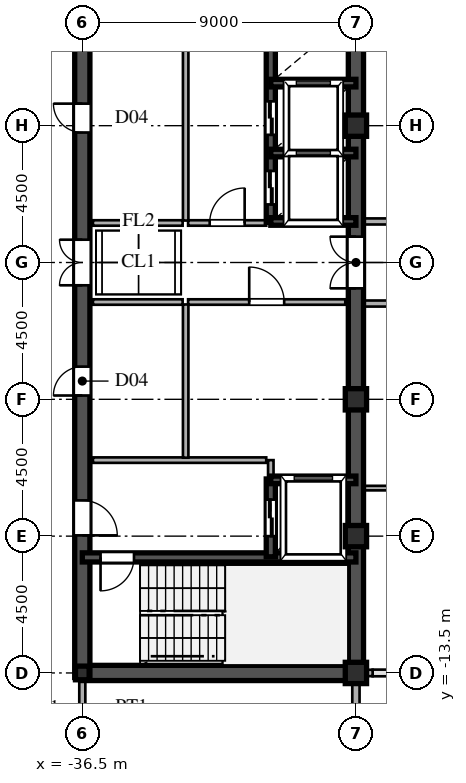
"""IFC4 building model, lengths in metres.
Left out: names, types, materials, properties, quantities, classifications, styles, units other than length and angle.
Written with IfcOpenShell. Run it as: python <this file> out.ifc"""

import sys

from ifc_helpers import new_model, si_unit, direction, frame, frame_2d, origin, origin_2d, place, context, subcontext, project, spatial, rectangle, hollow_rectangle, i_section, extrude, source, transform, mapped, element, fill, save


model = new_model("IFC4")
c1 = context("Model", 3, precision=1e-05, world=origin(), true_north=direction((0.0, 1.0)))
c2 = subcontext(c1, "Body", "Model", "MODEL_VIEW")
j1 = project(units=[si_unit("LENGTHUNIT", "METRE"), si_unit("PLANEANGLEUNIT", "RADIAN")], contexts=[c1])
p1 = place(None, origin())
s1 = spatial("IfcSite", under=j1, at=p1, CompositionType="ELEMENT")
p2 = place(p1, origin())
s2 = spatial("IfcBuilding", under=s1, at=p2, CompositionType="ELEMENT")
p3 = place(p2, frame((0.0, 0.0, 261.9)))
s3 = spatial("IfcBuildingStorey", under=s2, at=p3, CompositionType="ELEMENT", Elevation=261.9)
m1 = source(origin(), c2, "Body", "SweptSolid", [
    extrude(hollow_rectangle(XDim=0.7, YDim=0.7, WallThickness=0.03, at=origin_2d()), origin(), (0.0, 0.0, 1.0), 3.75),
])
for number, where, z_axis, x_axis in (
    (1, (-27.5, -13.5, 0.0), (0.0, 0.0, 1.0), (1.0, 0.0, 0.0)),
    (2, (-27.5, -9.0, 0.0), (0.0, 0.0, 1.0), (1.0, 0.0, 0.0)),
    (3, (-27.5, -4.5, 0.0), (0.0, 0.0, 1.0), (1.0, 0.0, 0.0)),
    (4, (-27.5, 4.5, 0.0), (0.0, 0.0, 1.0), (1.0, 0.0, 0.0)),
):
    element("IfcColumn", number, at=place(p3, frame(where, z_axis=z_axis, x_axis=x_axis)), inside=s3, PredefinedType="COLUMN", context=c2, shape_type="MappedRepresentation", body=[
        mapped(m1, transform((0.0, 0.0, 0.0), scale=1.0)),
    ])
m2 = source(origin(), c2, "Body", "SweptSolid", [
    extrude(i_section(OverallWidth=0.45, OverallDepth=0.45, WebThickness=0.016, FlangeThickness=0.025, at=origin_2d()), origin(), (0.0, 0.0, 1.0), 3.75),
])
p4 = place(p3, frame((-36.5, -13.5, 0.0), z_axis=(0.0, 0.0, 1.0), x_axis=(1.0, 0.0, 0.0)))
e5 = element("IfcColumn", 5, at=p4, inside=s3, PredefinedType="COLUMN", context=c2, shape_type="MappedRepresentation", body=[
    mapped(m2, transform((0.0, 0.0, 0.0), scale=1.0)),
])
p5 = place(p3, frame((-27.5, -15.98, 0.0), z_axis=(0.0, 0.0, 1.0), x_axis=(0.0, 1.0, 0.0)))
e6 = element("IfcWall", 6, at=p5, inside=s3, PredefinedType="SOLIDWALL", context=c2, shape_type="SweptSolid", body=[
    extrude(rectangle(XDim=1.605, YDim=0.24, at=frame_2d((0.803, 0.0))), origin(), (0.0, 0.0, 1.0), 3.53),
])
p6 = place(p3, frame((-27.5, -14.375, 0.0), z_axis=(0.0, 0.0, 1.0), x_axis=(0.0, 1.0, 0.0)))
e7 = element("IfcWall", 7, at=p6, inside=s3, PredefinedType="SOLIDWALL", context=c2, shape_type="SweptSolid", body=[
    extrude(rectangle(XDim=0.62, YDim=0.24, at=frame_2d((0.31, 0.0))), origin(), (0.0, 0.0, 1.0), 3.03),
])
p7 = place(p3, frame((-27.49, -13.5, 0.0), z_axis=(0.0, 0.0, 1.0), x_axis=(1.0, 0.0, 0.0)))
e8 = element("IfcWall", 8, at=p7, inside=s3, PredefinedType="SOLIDWALL", context=c2, shape_type="SweptSolid", body=[
    extrude(rectangle(XDim=0.54, YDim=0.21, at=frame_2d((0.27, 0.0))), origin(), (0.0, 0.0, 1.0), 3.03),
])
for number, where, z_axis, x_axis in (
    (9, (-27.5, -13.5, 0.0), (0.0, 0.0, 1.0), (0.0, 1.0, 0.0)),
    (10, (-27.5, 1.3, 0.0), (0.0, 0.0, 1.0), (0.0, 1.0, 0.0)),
):
    element("IfcWall", number, at=place(p3, frame(where, z_axis=z_axis, x_axis=x_axis)), inside=s3, PredefinedType="SHEAR", context=c2, shape_type="SweptSolid", body=[
        extrude(rectangle(XDim=12.2, YDim=0.5, at=frame_2d((6.1, 0.0))), origin(), (0.0, 0.0, 1.0), 3.53),
    ])
p8 = place(p3, frame((-27.5, -1.3, 0.0), z_axis=(0.0, 0.0, 1.0), x_axis=(0.0, 1.0, 0.0)))
e11 = element("IfcWall", 11, at=p8, inside=s3, PredefinedType="SHEAR", context=c2, shape_type="SweptSolid", body=[
    extrude(rectangle(XDim=2.6, YDim=0.5, at=frame_2d((1.3, 0.0))), origin(), (0.0, 0.0, 1.0), 3.53),
])
p9 = place(p8, frame((0.45, 0.0, 0.0)))
e12 = element("IfcOpeningElement", 12, at=p9, cuts=e11, PredefinedType="OPENING", context=c2, shape_type="SweptSolid", body=[
    extrude(rectangle(XDim=1.7, YDim=2.35, at=frame_2d((0.85, 1.175))), frame((0.0, 0.26, 0.0), z_axis=(0.0, -1.0, 0.0), x_axis=(1.0, 0.0, 0.0)), (0.0, 0.0, 1.0), 0.52),
])
p10 = place(p3, frame((-36.5, -13.5, 0.0), z_axis=(0.0, 0.0, 1.0), x_axis=(1.0, 0.0, 0.0)))
e13 = element("IfcWall", 13, at=p10, inside=s3, PredefinedType="SHEAR", context=c2, shape_type="SweptSolid", body=[
    extrude(rectangle(XDim=9.0, YDim=0.5, at=frame_2d((4.5, 0.0))), origin(), (0.0, 0.0, 1.0), 3.53),
])
p11 = place(p3, frame((-36.5, -13.65, 0.0), z_axis=(0.0, 0.0, 1.0), x_axis=(0.0, 1.0, 0.0)))
e14 = element("IfcWall", 14, at=p11, inside=s3, PredefinedType="SHEAR", context=c2, shape_type="SweptSolid", body=[
    extrude(rectangle(XDim=7.15, YDim=0.5, at=frame_2d((3.575, 0.0))), origin(), (0.0, 0.0, 1.0), 3.53),
])
p12 = place(p11, frame((4.675, 0.0, 0.0)))
e15 = element("IfcOpeningElement", 15, at=p12, cuts=e14, PredefinedType="OPENING", context=c2, shape_type="SweptSolid", body=[
    extrude(rectangle(XDim=1.15, YDim=2.2, at=frame_2d((0.575, 1.1))), frame((0.0, 0.26, 0.0), z_axis=(0.0, -1.0, 0.0), x_axis=(1.0, 0.0, 0.0)), (0.0, 0.0, 1.0), 0.52),
])
p13 = place(p3, frame((-36.5, -1.3, 0.0), z_axis=(0.0, 0.0, 1.0), x_axis=(0.0, 1.0, 0.0)))
e16 = element("IfcWall", 16, at=p13, inside=s3, PredefinedType="SHEAR", context=c2, shape_type="SweptSolid", body=[
    extrude(rectangle(XDim=2.6, YDim=0.5, at=frame_2d((1.3, 0.0))), origin(), (0.0, 0.0, 1.0), 3.53),
])
p14 = place(p13, frame((0.55, 0.0, 0.0)))
e17 = element("IfcOpeningElement", 17, at=p14, cuts=e16, PredefinedType="OPENING", context=c2, shape_type="SweptSolid", body=[
    extrude(rectangle(XDim=1.5, YDim=2.3, at=frame_2d((0.75, 1.15))), frame((0.0, 0.26, 0.0), z_axis=(0.0, -1.0, 0.0), x_axis=(1.0, 0.0, 0.0)), (0.0, 0.0, 1.0), 0.52),
])
p15 = place(p3, frame((-36.5, -6.5, 0.0), z_axis=(0.0, 0.0, 1.0), x_axis=(0.0, 1.0, 0.0)))
e18 = element("IfcWall", 18, at=p15, inside=s3, PredefinedType="SHEAR", context=c2, shape_type="SweptSolid", body=[
    extrude(rectangle(XDim=5.2, YDim=0.5, at=frame_2d((2.6, 0.0))), origin(), (0.0, 0.0, 1.0), 3.53),
])
p16 = place(p15, frame((2.125, 0.0, 0.0)))
e19 = element("IfcOpeningElement", 19, at=p16, cuts=e18, PredefinedType="OPENING", context=c2, shape_type="SweptSolid", body=[
    extrude(rectangle(XDim=0.95, YDim=2.15, at=frame_2d((0.475, 1.075))), frame((0.0, 0.26, 0.0), z_axis=(0.0, -1.0, 0.0), x_axis=(1.0, 0.0, 0.0)), (0.0, 0.0, 1.0), 0.52),
])
p17 = place(p3, frame((-36.5, 1.3, 0.0), z_axis=(0.0, 0.0, 1.0), x_axis=(0.0, 1.0, 0.0)))
e20 = element("IfcWall", 20, at=p17, inside=s3, PredefinedType="SHEAR", context=c2, shape_type="SweptSolid", body=[
    extrude(rectangle(XDim=6.9, YDim=0.5, at=frame_2d((3.45, 0.0))), origin(), (0.0, 0.0, 1.0), 3.53),
])
p18 = place(p17, frame((2.975, 0.0, 0.0)))
e21 = element("IfcOpeningElement", 21, at=p18, cuts=e20, PredefinedType="OPENING", context=c2, shape_type="SweptSolid", body=[
    extrude(rectangle(XDim=0.95, YDim=2.15, at=frame_2d((0.475, 1.075))), frame((0.0, 0.26, 0.0), z_axis=(0.0, -1.0, 0.0), x_axis=(1.0, 0.0, 0.0)), (0.0, 0.0, 1.0), 0.52),
])
p19 = place(p3, frame((-36.5, -9.7, 0.0), z_axis=(0.0, 0.0, 1.0), x_axis=(1.0, 0.0, 0.0)))
e22 = element("IfcWall", 22, at=p19, inside=s3, PredefinedType="SHEAR", context=c2, shape_type="SweptSolid", body=[
    extrude(rectangle(XDim=9.0, YDim=0.3, at=frame_2d((4.5, 0.0))), origin(), (0.0, 0.0, 1.0), 3.53),
])
p20 = place(p19, frame((0.6, 0.0, 0.0)))
e23 = element("IfcOpeningElement", 23, at=p20, cuts=e22, PredefinedType="OPENING", context=c2, shape_type="SweptSolid", body=[
    extrude(rectangle(XDim=1.1, YDim=2.2, at=frame_2d((0.55, 1.1))), frame((0.0, 0.16, 0.0), z_axis=(0.0, -1.0, 0.0), x_axis=(1.0, 0.0, 0.0)), (0.0, 0.0, 1.0), 0.32),
])
for number, where, z_axis, x_axis in (
    (24, (-30.3, -7.15, 0.0), (0.0, 0.0, 1.0), (1.0, 0.0, 0.0)),
    (25, (-30.3, 1.35, 0.0), (0.0, 0.0, 1.0), (1.0, 0.0, 0.0)),
    (26, (-30.3, 3.6, 0.0), (0.0, 0.0, 1.0), (1.0, 0.0, 0.0)),
    (27, (-30.3, 5.9, 0.0), (0.0, 0.0, 1.0), (1.0, 0.0, 0.0)),
):
    element("IfcWall", number, at=place(p3, frame(where, z_axis=z_axis, x_axis=x_axis)), inside=s3, PredefinedType="SHEAR", context=c2, shape_type="SweptSolid", body=[
        extrude(rectangle(XDim=2.8, YDim=0.25, at=frame_2d((1.4, 0.0))), origin(), (0.0, 0.0, 1.0), 3.53),
    ])
p21 = place(p3, frame((-30.3, -9.68, 0.0), z_axis=(0.0, 0.0, 1.0), x_axis=(0.0, 1.0, 0.0)))
e28 = element("IfcWall", 28, at=p21, inside=s3, PredefinedType="SHEAR", context=c2, shape_type="SweptSolid", body=[
    extrude(rectangle(XDim=2.56, YDim=0.3, at=frame_2d((1.28, 0.0))), origin(), (0.0, 0.0, 1.0), 3.53),
])
p22 = place(p21, frame((0.68, 0.0, 0.0)))
e29 = element("IfcOpeningElement", 29, at=p22, cuts=e28, PredefinedType="OPENING", context=c2, shape_type="SweptSolid", body=[
    extrude(rectangle(XDim=1.2, YDim=2.25, at=frame_2d((0.6, 1.125))), frame((0.0, 0.16, 0.0), z_axis=(0.0, -1.0, 0.0), x_axis=(1.0, 0.0, 0.0)), (0.0, 0.0, 1.0), 0.32),
])
p23 = place(p3, frame((-30.3, 1.32, 0.0), z_axis=(0.0, 0.0, 1.0), x_axis=(0.0, 1.0, 0.0)))
e30 = element("IfcWall", 30, at=p23, inside=s3, PredefinedType="SHEAR", context=c2, shape_type="SweptSolid", body=[
    extrude(rectangle(XDim=2.28, YDim=0.3, at=frame_2d((1.14, 0.0))), origin(), (0.0, 0.0, 1.0), 3.53),
])
p24 = place(p23, frame((0.59, 0.0, 0.0)))
e31 = element("IfcOpeningElement", 31, at=p24, cuts=e30, PredefinedType="OPENING", context=c2, shape_type="SweptSolid", body=[
    extrude(rectangle(XDim=1.1, YDim=2.2, at=frame_2d((0.55, 1.1))), frame((0.0, 0.16, 0.0), z_axis=(0.0, -1.0, 0.0), x_axis=(1.0, 0.0, 0.0)), (0.0, 0.0, 1.0), 0.32),
])
p25 = place(p3, frame((-30.3, 3.6, 0.0), z_axis=(0.0, 0.0, 1.0), x_axis=(0.0, 1.0, 0.0)))
e32 = element("IfcWall", 32, at=p25, inside=s3, PredefinedType="SHEAR", context=c2, shape_type="SweptSolid", body=[
    extrude(rectangle(XDim=2.3, YDim=0.3, at=frame_2d((1.15, 0.0))), origin(), (0.0, 0.0, 1.0), 3.53),
])
p26 = place(p25, frame((0.6, 0.0, 0.0)))
e33 = element("IfcOpeningElement", 33, at=p26, cuts=e32, PredefinedType="OPENING", context=c2, shape_type="SweptSolid", body=[
    extrude(rectangle(XDim=1.1, YDim=2.2, at=frame_2d((0.55, 1.1))), frame((0.0, 0.16, 0.0), z_axis=(0.0, -1.0, 0.0), x_axis=(1.0, 0.0, 0.0)), (0.0, 0.0, 1.0), 0.32),
])
p27 = place(p3, frame((-30.3, 5.9, 0.0), z_axis=(0.0, 0.0, 1.0), x_axis=(0.0, 1.0, 0.0)))
e34 = element("IfcWall", 34, at=p27, inside=s3, PredefinedType="SHEAR", context=c2, shape_type="SweptSolid", body=[
    extrude(rectangle(XDim=2.25, YDim=0.3, at=frame_2d((1.125, 0.0))), origin(), (0.0, 0.0, 1.0), 3.53),
])
p28 = place(p3, frame((-36.15, -6.5, 0.0), z_axis=(0.0, 0.0, 1.0), x_axis=(1.0, 0.0, 0.0)))
e35 = element("IfcWall", 35, at=p28, inside=s3, PredefinedType="PARTITIONING", context=c2, shape_type="SweptSolid", body=[
    extrude(rectangle(XDim=5.7, YDim=0.18, at=frame_2d((2.85, 0.0))), origin(), (0.0, 0.0, 1.0), 3.53),
])
p29 = place(p3, frame((-30.3, -7.12, 0.0), z_axis=(0.0, 0.0, 1.0), x_axis=(0.0, 1.0, 0.0)))
e36 = element("IfcWall", 36, at=p29, inside=s3, PredefinedType="PARTITIONING", context=c2, shape_type="SweptSolid", body=[
    extrude(rectangle(XDim=0.62, YDim=0.18, at=frame_2d((0.31, 0.0))), origin(), (0.0, 0.0, 1.0), 3.53),
])
p30 = place(p3, frame((-33.1, -6.42, 0.0), z_axis=(0.0, 0.0, 1.0), x_axis=(0.0, 1.0, 0.0)))
e37 = element("IfcWall", 37, at=p30, inside=s3, PredefinedType="PARTITIONING", context=c2, shape_type="SweptSolid", body=[
    extrude(rectangle(XDim=5.04, YDim=0.18, at=frame_2d((2.52, 0.0))), origin(), (0.0, 0.0, 1.0), 3.53),
])
p31 = place(p3, frame((-33.1, 1.38, 0.0), z_axis=(0.0, 0.0, 1.0), x_axis=(0.0, 1.0, 0.0)))
e38 = element("IfcWall", 38, at=p31, inside=s3, PredefinedType="PARTITIONING", context=c2, shape_type="SweptSolid", body=[
    extrude(rectangle(XDim=6.74, YDim=0.18, at=frame_2d((3.37, 0.0))), origin(), (0.0, 0.0, 1.0), 3.53),
])
p32 = place(p3, frame((-33.02, -1.3, 0.0), z_axis=(0.0, 0.0, 1.0), x_axis=(1.0, 0.0, 0.0)))
e39 = element("IfcWall", 39, at=p32, inside=s3, PredefinedType="PARTITIONING", context=c2, shape_type="SweptSolid", body=[
    extrude(rectangle(XDim=5.17, YDim=0.18, at=frame_2d((2.585, 0.0))), origin(), (0.0, 0.0, 1.0), 3.53),
])
p33 = place(p32, frame((2.01, 0.0, 0.0)))
e40 = element("IfcOpeningElement", 40, at=p33, cuts=e39, PredefinedType="OPENING", context=c2, shape_type="SweptSolid", body=[
    extrude(rectangle(XDim=1.15, YDim=2.2, at=frame_2d((0.575, 1.1))), frame((0.0, 0.1, 0.0), z_axis=(0.0, -1.0, 0.0), x_axis=(1.0, 0.0, 0.0)), (0.0, 0.0, 1.0), 0.2),
])
p34 = place(p3, frame((-33.02, 1.3, 0.0), z_axis=(0.0, 0.0, 1.0), x_axis=(1.0, 0.0, 0.0)))
e41 = element("IfcWall", 41, at=p34, inside=s3, PredefinedType="PARTITIONING", context=c2, shape_type="SweptSolid", body=[
    extrude(rectangle(XDim=2.57, YDim=0.18, at=frame_2d((1.285, 0.0))), origin(), (0.0, 0.0, 1.0), 3.53),
])
p35 = place(p34, frame((0.71, 0.0, 0.0)))
e42 = element("IfcOpeningElement", 42, at=p35, cuts=e41, PredefinedType="OPENING", context=c2, shape_type="SweptSolid", body=[
    extrude(rectangle(XDim=1.15, YDim=2.2, at=frame_2d((0.575, 1.1))), frame((0.0, 0.1, 0.0), z_axis=(0.0, -1.0, 0.0), x_axis=(1.0, 0.0, 0.0)), (0.0, 0.0, 1.0), 0.2),
])
for number, where, z_axis, x_axis in (
    (43, (-36.15, -1.3, 0.0), (0.0, 0.0, 1.0), (1.0, 0.0, 0.0)),
    (44, (-36.15, 1.3, 0.0), (0.0, 0.0, 1.0), (1.0, 0.0, 0.0)),
):
    element("IfcWall", number, at=place(p3, frame(where, z_axis=z_axis, x_axis=x_axis)), inside=s3, PredefinedType="PARTITIONING", context=c2, shape_type="SweptSolid", body=[
        extrude(rectangle(XDim=2.95, YDim=0.18, at=frame_2d((1.475, 0.0))), origin(), (0.0, 0.0, 1.0), 3.53),
    ])
p36 = place(p3, frame((-27.245, -7.42, 0.0), z_axis=(0.0, 0.0, 1.0), x_axis=(1.0, 0.0, 0.0)))
e45 = element("IfcWall", 45, at=p36, inside=s3, PredefinedType="PARTITIONING", context=c2, shape_type="SweptSolid", body=[
    extrude(rectangle(XDim=6.16, YDim=0.15, at=frame_2d((3.08, 0.0))), origin(), (0.0, 0.0, 1.0), 3.53),
])
p37 = place(p36, frame((2.82, 0.0, 0.0)))
e46 = element("IfcOpeningElement", 46, at=p37, cuts=e45, PredefinedType="OPENING", context=c2, shape_type="SweptSolid", body=[
    extrude(rectangle(XDim=0.95, YDim=2.15, at=frame_2d((0.475, 1.075))), frame((0.0, 0.085, 0.0), z_axis=(0.0, -1.0, 0.0), x_axis=(1.0, 0.0, 0.0)), (0.0, 0.0, 1.0), 0.17),
])
p38 = place(p3, frame((-27.245, -1.35, 0.0), z_axis=(0.0, 0.0, 1.0), x_axis=(1.0, 0.0, 0.0)))
e47 = element("IfcWall", 47, at=p38, inside=s3, PredefinedType="PARTITIONING", context=c2, shape_type="SweptSolid", body=[
    extrude(rectangle(XDim=54.49, YDim=0.2, at=frame_2d((27.245, 0.0))), origin(), (0.0, 0.0, 1.0), 3.53),
])
p39 = place(p38, frame((22.47, 0.0, 0.0)))
e48 = element("IfcOpeningElement", 48, at=p39, cuts=e47, PredefinedType="OPENING", context=c2, shape_type="SweptSolid", body=[
    extrude(rectangle(XDim=1.05, YDim=2.25, at=frame_2d((0.525, 1.125))), frame((0.0, 0.11, 0.0), z_axis=(0.0, -1.0, 0.0), x_axis=(1.0, 0.0, 0.0)), (0.0, 0.0, 1.0), 0.22),
])
p40 = place(p3, frame((-27.245, 1.35, 0.0), z_axis=(0.0, 0.0, 1.0), x_axis=(1.0, 0.0, 0.0)))
e49 = element("IfcWall", 49, at=p40, inside=s3, PredefinedType="PARTITIONING", context=c2, shape_type="SweptSolid", body=[
    extrude(rectangle(XDim=54.49, YDim=0.2, at=frame_2d((27.245, 0.0))), origin(), (0.0, 0.0, 1.0), 3.53),
])
p41 = place(p40, frame((22.47, 0.0, 0.0)))
e50 = element("IfcOpeningElement", 50, at=p41, cuts=e49, PredefinedType="OPENING", context=c2, shape_type="SweptSolid", body=[
    extrude(rectangle(XDim=1.05, YDim=2.25, at=frame_2d((0.525, 1.125))), frame((0.0, 0.11, 0.0), z_axis=(0.0, -1.0, 0.0), x_axis=(1.0, 0.0, 0.0)), (0.0, 0.0, 1.0), 0.22),
])
p42 = place(p3, frame((-36.5, -15.515, 0.0), z_axis=(0.0, 0.0, 1.0), x_axis=(0.0, 1.0, 0.0)))
e51 = element("IfcWall", 51, at=p42, inside=s3, PredefinedType="PARTITIONING", context=c2, shape_type="SweptSolid", body=[
    extrude(rectangle(XDim=1.76, YDim=0.2, at=frame_2d((0.88, 0.0))), origin(), (0.0, 0.0, 1.0), 2.93),
])
m3 = source(origin(), c2, "Body", "SweptSolid", [
    extrude(rectangle(XDim=1.7, YDim=2.35, at=frame_2d((0.85, 1.175))), frame((0.0, 0.025, 0.0), z_axis=(0.0, -1.0, 0.0), x_axis=(1.0, 0.0, 0.0)), (0.0, 0.0, 1.0), 0.05),
])
p43 = place(p9, origin())
e52 = element("IfcDoor", 52, at=p43, inside=s3, OperationType="DOUBLE_SWING_LEFT", PredefinedType="DOOR", context=c2, shape_type="MappedRepresentation", body=[
    mapped(m3, transform((0.0, 0.0, 0.0), scale=1.0)),
])
fill(e12, e52)
m4 = source(origin(), c2, "Body", "SweptSolid", [
    extrude(rectangle(XDim=1.15, YDim=2.2, at=frame_2d((0.575, 1.1))), frame((0.0, 0.025, 0.0), z_axis=(0.0, -1.0, 0.0), x_axis=(1.0, 0.0, 0.0)), (0.0, 0.0, 1.0), 0.05),
])
p44 = place(p12, frame((1.15, 0.0, 0.0), z_axis=(0.0, 0.0, 1.0), x_axis=(-1.0, 0.0, 0.0)))
e53 = element("IfcDoor", 53, at=p44, inside=s3, OperationType="SINGLE_SWING_LEFT", PredefinedType="DOOR", context=c2, shape_type="MappedRepresentation", body=[
    mapped(m4, transform((0.0, 0.0, 0.0), scale=1.0)),
])
fill(e15, e53)
m5 = source(origin(), c2, "Body", "SweptSolid", [
    extrude(rectangle(XDim=1.5, YDim=2.3, at=frame_2d((0.75, 1.15))), frame((0.0, 0.025, 0.0), z_axis=(0.0, -1.0, 0.0), x_axis=(1.0, 0.0, 0.0)), (0.0, 0.0, 1.0), 0.05),
])
p45 = place(p14, origin())
e54 = element("IfcDoor", 54, at=p45, inside=s3, OperationType="DOUBLE_SWING_LEFT", PredefinedType="DOOR", context=c2, shape_type="MappedRepresentation", body=[
    mapped(m5, transform((0.0, 0.0, 0.0), scale=1.0)),
])
fill(e17, e54)
m6 = source(origin(), c2, "Body", "SweptSolid", [
    extrude(rectangle(XDim=0.95, YDim=2.15, at=frame_2d((0.475, 1.075))), frame((0.0, 0.025, 0.0), z_axis=(0.0, -1.0, 0.0), x_axis=(1.0, 0.0, 0.0)), (0.0, 0.0, 1.0), 0.05),
])
p46 = place(p16, origin())
e55 = element("IfcDoor", 55, at=p46, inside=s3, OperationType="SINGLE_SWING_LEFT", PredefinedType="DOOR", context=c2, shape_type="MappedRepresentation", body=[
    mapped(m6, transform((0.0, 0.0, 0.0), scale=1.0)),
])
fill(e19, e55)
p47 = place(p18, origin())
e56 = element("IfcDoor", 56, at=p47, inside=s3, OperationType="SINGLE_SWING_RIGHT", PredefinedType="DOOR", context=c2, shape_type="MappedRepresentation", body=[
    mapped(m6, transform((0.0, 0.0, 0.0), scale=1.0)),
])
fill(e21, e56)
m7 = source(origin(), c2, "Body", "SweptSolid", [
    extrude(rectangle(XDim=1.1, YDim=2.2, at=frame_2d((0.55, 1.1))), frame((0.0, 0.025, 0.0), z_axis=(0.0, -1.0, 0.0), x_axis=(1.0, 0.0, 0.0)), (0.0, 0.0, 1.0), 0.05),
])
p48 = place(p20, frame((1.1, 0.0, 0.0), z_axis=(0.0, 0.0, 1.0), x_axis=(-1.0, 0.0, 0.0)))
e57 = element("IfcDoor", 57, at=p48, inside=s3, OperationType="SINGLE_SWING_LEFT", PredefinedType="DOOR", context=c2, shape_type="MappedRepresentation", body=[
    mapped(m7, transform((0.0, 0.0, 0.0), scale=1.0)),
])
fill(e23, e57)
m8 = source(origin(), c2, "Body", "SweptSolid", [
    extrude(rectangle(XDim=1.2, YDim=2.25, at=frame_2d((0.6, 1.125))), frame((0.0, 0.025, 0.0), z_axis=(0.0, -1.0, 0.0), x_axis=(1.0, 0.0, 0.0)), (0.0, 0.0, 1.0), 0.05),
])
p49 = place(p22, origin())
e58 = element("IfcDoor", 58, at=p49, inside=s3, OperationType="DOUBLE_DOOR_SLIDING", PredefinedType="DOOR", context=c2, shape_type="MappedRepresentation", body=[
    mapped(m8, transform((0.0, 0.0, 0.0), scale=1.0)),
])
fill(e29, e58)
m9 = source(origin(), c2, "Body", "SweptSolid", [
    extrude(rectangle(XDim=1.1, YDim=2.2, at=frame_2d((0.55, 1.1))), frame((0.0, 0.025, 0.0), z_axis=(0.0, -1.0, 0.0), x_axis=(1.0, 0.0, 0.0)), (0.0, 0.0, 1.0), 0.05),
])
p50 = place(p24, origin())
e59 = element("IfcDoor", 59, at=p50, inside=s3, OperationType="DOUBLE_DOOR_SLIDING", PredefinedType="DOOR", context=c2, shape_type="MappedRepresentation", body=[
    mapped(m9, transform((0.0, 0.0, 0.0), scale=1.0)),
])
fill(e31, e59)
p51 = place(p26, origin())
e60 = element("IfcDoor", 60, at=p51, inside=s3, OperationType="DOUBLE_DOOR_SLIDING", PredefinedType="DOOR", context=c2, shape_type="MappedRepresentation", body=[
    mapped(m9, transform((0.0, 0.0, 0.0), scale=1.0)),
])
fill(e33, e60)
p52 = place(p33, origin())
e61 = element("IfcDoor", 61, at=p52, inside=s3, OperationType="SINGLE_SWING_LEFT", PredefinedType="DOOR", context=c2, shape_type="MappedRepresentation", body=[
    mapped(m4, transform((0.0, 0.0, 0.0), scale=1.0)),
])
fill(e40, e61)
p53 = place(p35, origin())
e62 = element("IfcDoor", 62, at=p53, inside=s3, OperationType="SINGLE_SWING_RIGHT", PredefinedType="DOOR", context=c2, shape_type="MappedRepresentation", body=[
    mapped(m4, transform((0.0, 0.0, 0.0), scale=1.0)),
])
fill(e42, e62)
save(model, sys.argv[1])
